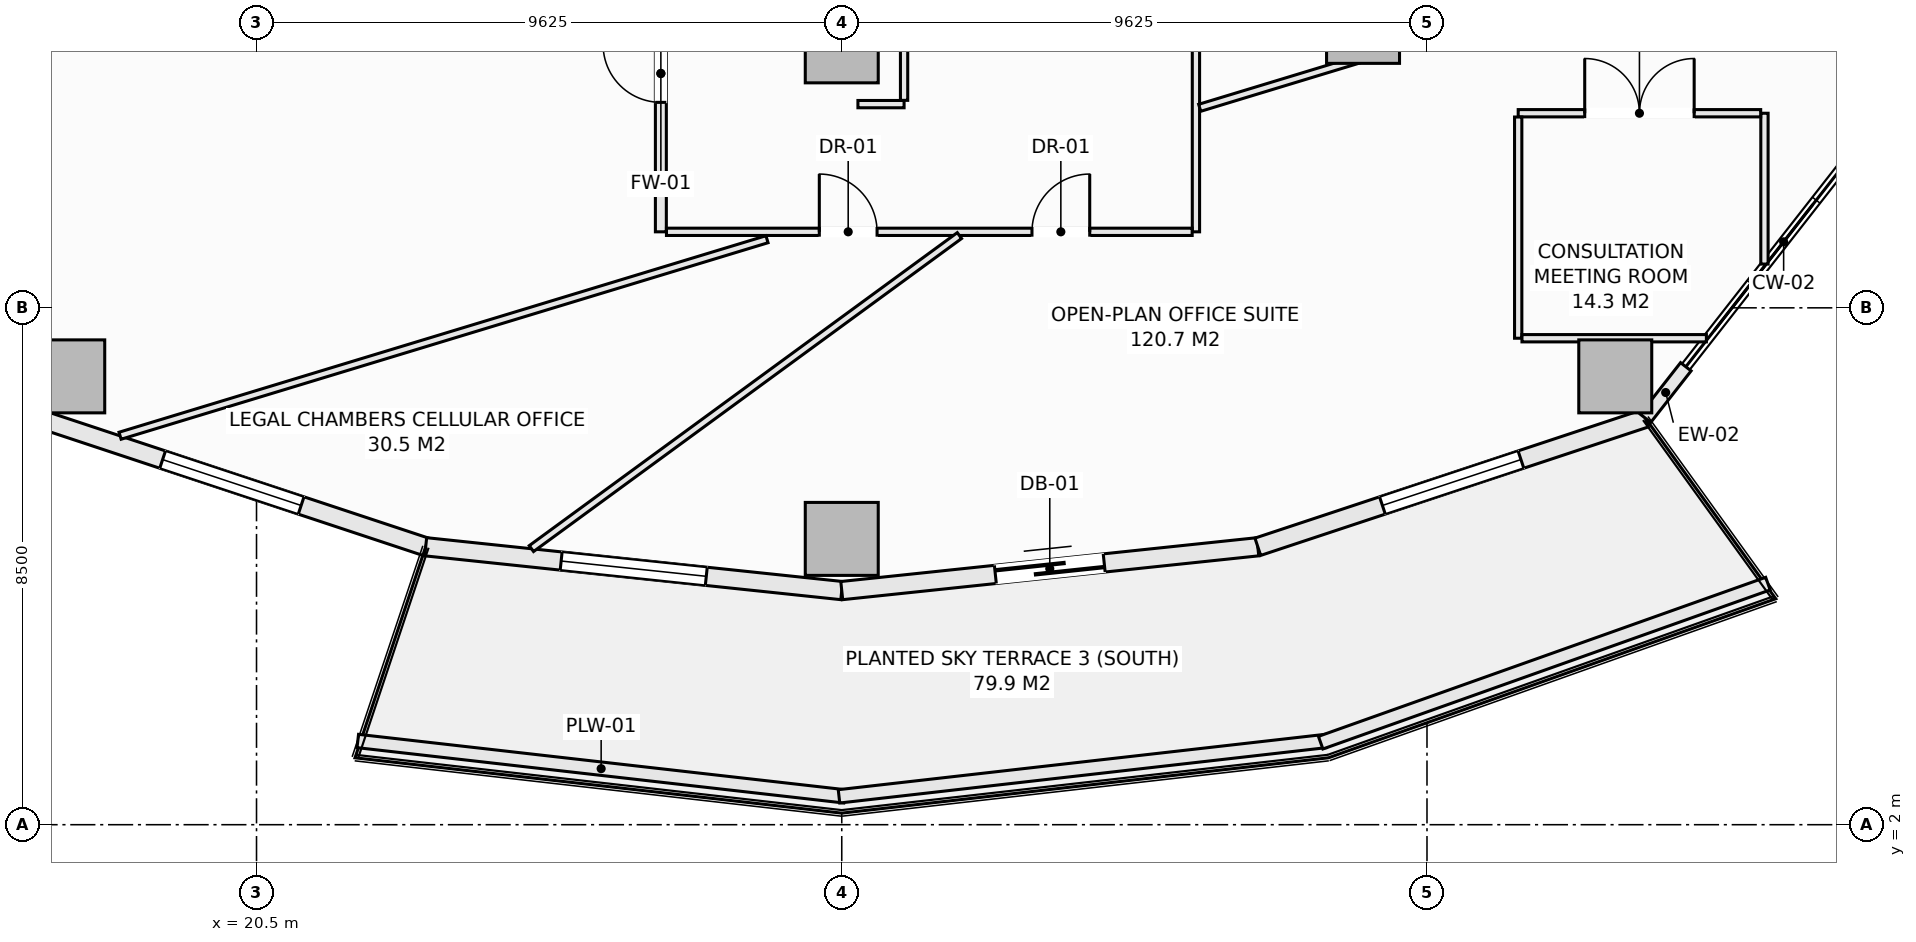
"""IFC4 building model, lengths in metres.
Left out: names, types, materials, properties, quantities, classifications, styles, units other than length and angle.
Written with IfcOpenShell. Run it as: python <this file> out.ifc"""

import sys

from ifc_helpers import new_model, si_unit, direction, frame, frame_2d, origin, origin_2d, place, context, subcontext, project, spatial, rectangle, extrude, element, fill, save


model = new_model("IFC4")
c1 = context("Model", 3, precision=1e-05, world=origin(), true_north=direction((0.0, 1.0)))
c2 = subcontext(c1, "Body", "Model", "MODEL_VIEW")
j1 = project(units=[si_unit("LENGTHUNIT", "METRE"), si_unit("PLANEANGLEUNIT", "RADIAN")], contexts=[c1])
p1 = place(None, origin())
s1 = spatial("IfcSite", under=j1, at=p1, CompositionType="ELEMENT")
p2 = place(p1, origin())
s2 = spatial("IfcBuilding", under=s1, at=p2, CompositionType="ELEMENT")
p3 = place(p2, frame((0.0, 0.0, 68.85)))
s3 = spatial("IfcBuildingStorey", under=s2, at=p3, CompositionType="ELEMENT", Elevation=68.85)
for number, where, z_axis, x_axis in (
    (1, (17.404, 9.373, -0.28), (0.0, 0.0, 1.0), (1.0, 0.0, 0.0)),
    (2, (30.125, 6.7, -0.28), (0.0, 0.0, 1.0), (1.0, 0.0, 0.0)),
    (3, (42.846, 9.373, -0.28), (0.0, 0.0, 1.0), (1.0, 0.0, 0.0)),
    (4, (30.125, 14.8, -0.28), (0.0, 0.0, 1.0), (1.0, 0.0, 0.0)),
    (5, (38.698, 15.121, -0.28), (0.0, 0.0, 1.0), (1.0, 0.0, 0.0)),
):
    element("IfcColumn", number, at=place(p3, frame(where, z_axis=z_axis, x_axis=x_axis)), inside=s3, PredefinedType="COLUMN", context=c2, shape_type="SweptSolid", body=[
        extrude(rectangle(XDim=1.2, YDim=1.2, at=origin_2d()), origin(), (0.0, 0.0, 1.0), 3.85),
    ])
p4 = place(p3, frame((16.906, 8.684, 0.0), z_axis=(0.0, 0.0, 1.0), x_axis=(0.949245153629, -0.314537181127, 0.0)))
e6 = element("IfcWall", 6, at=p4, inside=s3, PredefinedType="SOLIDWALL", context=c2, shape_type="SweptSolid", body=[
    extrude(rectangle(XDim=6.717, YDim=0.3, at=frame_2d((3.358, 0.0))), origin(), (0.0, 0.0, 1.0), 3.093),
])
p5 = place(p4, frame((2.159, 0.0, 0.85)))
e7 = element("IfcOpeningElement", 7, at=p5, cuts=e6, PredefinedType="OPENING", context=c2, shape_type="SweptSolid", body=[
    extrude(rectangle(XDim=2.4, YDim=1.9, at=frame_2d((1.2, 0.95))), frame((0.0, 0.16, 0.0), z_axis=(0.0, -1.0, 0.0), x_axis=(1.0, 0.0, 0.0)), (0.0, 0.0, 1.0), 0.32),
])
p6 = place(p3, frame((23.282, 6.571, 0.0), z_axis=(0.0, 0.0, 1.0), x_axis=(0.994498840295, -0.104747585419, 0.0)))
e8 = element("IfcWall", 8, at=p6, inside=s3, PredefinedType="SOLIDWALL", context=c2, shape_type="SweptSolid", body=[
    extrude(rectangle(XDim=6.88, YDim=0.3, at=frame_2d((3.44, 0.0))), origin(), (0.0, 0.0, 1.0), 3.093),
])
p7 = place(p6, frame((2.24, 0.0, 0.85)))
e9 = element("IfcOpeningElement", 9, at=p7, cuts=e8, PredefinedType="OPENING", context=c2, shape_type="SweptSolid", body=[
    extrude(rectangle(XDim=2.4, YDim=1.9, at=frame_2d((1.2, 0.95))), frame((0.0, 0.16, 0.0), z_axis=(0.0, -1.0, 0.0), x_axis=(1.0, 0.0, 0.0)), (0.0, 0.0, 1.0), 0.32),
])
p8 = place(p3, frame((30.125, 5.85, 0.0), z_axis=(0.0, 0.0, 1.0), x_axis=(0.994498840295, 0.104747585419, 0.0)))
e10 = element("IfcWall", 10, at=p8, inside=s3, PredefinedType="SOLIDWALL", context=c2, shape_type="SweptSolid", body=[
    extrude(rectangle(XDim=6.88, YDim=0.3, at=frame_2d((3.44, 0.0))), origin(), (0.0, 0.0, 1.0), 3.093),
])
p9 = place(p8, frame((2.54, 0.0, 0.0)))
e11 = element("IfcOpeningElement", 11, at=p9, cuts=e10, PredefinedType="OPENING", context=c2, shape_type="SweptSolid", body=[
    extrude(rectangle(XDim=1.8, YDim=2.25, at=frame_2d((0.9, 1.125))), frame((0.0, 0.16, 0.0), z_axis=(0.0, -1.0, 0.0), x_axis=(1.0, 0.0, 0.0)), (0.0, 0.0, 1.0), 0.32),
])
p10 = place(p3, frame((36.968, 6.571, 0.0), z_axis=(0.0, 0.0, 1.0), x_axis=(0.949245153629, 0.314537181127, 0.0)))
e12 = element("IfcWall", 12, at=p10, inside=s3, PredefinedType="SOLIDWALL", context=c2, shape_type="SweptSolid", body=[
    extrude(rectangle(XDim=6.717, YDim=0.3, at=frame_2d((3.358, 0.0))), origin(), (0.0, 0.0, 1.0), 3.093),
])
p11 = place(p10, frame((2.159, 0.0, 0.85)))
e13 = element("IfcOpeningElement", 13, at=p11, cuts=e12, PredefinedType="OPENING", context=c2, shape_type="SweptSolid", body=[
    extrude(rectangle(XDim=2.4, YDim=1.9, at=frame_2d((1.2, 0.95))), frame((0.0, 0.16, 0.0), z_axis=(0.0, -1.0, 0.0), x_axis=(1.0, 0.0, 0.0)), (0.0, 0.0, 1.0), 0.32),
])
p12 = place(p3, frame((43.344, 8.684, 0.0), z_axis=(0.0, 0.0, 1.0), x_axis=(0.616387780378, 0.787442762492, 0.0)))
e14 = element("IfcWall", 14, at=p12, inside=s3, PredefinedType="SOLIDWALL", context=c2, shape_type="SweptSolid", body=[
    extrude(rectangle(XDim=1.076, YDim=0.22, at=frame_2d((0.538, 0.0))), origin(), (0.0, 0.0, 1.0), 3.093),
])
for number, where, z_axis, x_axis in (
    (15, (22.166, 3.376, 0.0), (0.0, 0.0, 1.0), (0.994, -0.113, 0.0)),
    (16, (30.08, 2.466, 0.0), (0.0, 0.0, 1.0), (0.994, 0.113, 0.0)),
):
    element("IfcWall", number, at=place(p3, frame(where, z_axis=z_axis, x_axis=x_axis)), inside=s3, PredefinedType="PARAPET", context=c2, shape_type="SweptSolid", body=[
        extrude(rectangle(XDim=8.056, YDim=0.22, at=frame_2d((4.028, 0.0))), origin(), (0.0, 0.0, 1.0), 0.52),
    ])
p13 = place(p3, frame((38.001, 3.349, 0.0), z_axis=(0.0, 0.0, 1.0), x_axis=(0.942203722205, 0.335040513764, 0.0)))
e17 = element("IfcWall", 17, at=p13, inside=s3, PredefinedType="PARAPET", context=c2, shape_type="SweptSolid", body=[
    extrude(rectangle(XDim=7.807, YDim=0.22, at=frame_2d((3.904, 0.0))), origin(), (0.0, 0.0, 1.0), 0.52),
])
p14 = place(p3, frame((27.15, 11.75, 0.0), z_axis=(0.0, 0.0, 1.0), x_axis=(0.0, 1.0, 0.0)))
e18 = element("IfcWall", 18, at=p14, inside=s3, PredefinedType="SOLIDWALL", context=c2, shape_type="SweptSolid", body=[
    extrude(rectangle(XDim=5.208, YDim=0.18, at=frame_2d((2.604, 0.0))), origin(), (0.0, 0.0, 1.0), 3.57),
])
p15 = place(p14, frame((2.129, 0.0, 0.0)))
e19 = element("IfcOpeningElement", 19, at=p15, cuts=e18, PredefinedType="OPENING", context=c2, shape_type="SweptSolid", body=[
    extrude(rectangle(XDim=0.95, YDim=2.1, at=frame_2d((0.475, 1.05))), frame((0.0, 0.1, 0.0), z_axis=(0.0, -1.0, 0.0), x_axis=(1.0, 0.0, 0.0)), (0.0, 0.0, 1.0), 0.2),
])
p16 = place(p3, frame((35.95, 11.75, 0.0), z_axis=(0.0, 0.0, 1.0), x_axis=(0.0, 1.0, 0.0)))
e20 = element("IfcWall", 20, at=p16, inside=s3, PredefinedType="PARTITIONING", context=c2, shape_type="SweptSolid", body=[
    extrude(rectangle(XDim=3.838, YDim=0.12, at=frame_2d((1.919, 0.0))), origin(), (0.0, 0.0, 1.0), 3.57),
])
p17 = place(p3, frame((27.242, 11.75, 0.0), z_axis=(0.0, 0.0, 1.0), x_axis=(1.0, 0.0, 0.0)))
e21 = element("IfcWall", 21, at=p17, inside=s3, PredefinedType="PARTITIONING", context=c2, shape_type="SweptSolid", body=[
    extrude(rectangle(XDim=8.646, YDim=0.12, at=frame_2d((4.323, 0.0))), origin(), (0.0, 0.0, 1.0), 3.57),
])
p18 = place(p17, frame((2.514, 0.0, 0.0)))
e22 = element("IfcOpeningElement", 22, at=p18, cuts=e21, PredefinedType="OPENING", context=c2, shape_type="SweptSolid", body=[
    extrude(rectangle(XDim=0.95, YDim=2.1, at=frame_2d((0.475, 1.05))), frame((0.0, 0.07, 0.0), z_axis=(0.0, -1.0, 0.0), x_axis=(1.0, 0.0, 0.0)), (0.0, 0.0, 1.0), 0.14),
])
p19 = place(p17, frame((6.011, 0.0, 0.0)))
e23 = element("IfcOpeningElement", 23, at=p19, cuts=e21, PredefinedType="OPENING", context=c2, shape_type="SweptSolid", body=[
    extrude(rectangle(XDim=0.95, YDim=2.1, at=frame_2d((0.475, 1.05))), frame((0.0, 0.07, 0.0), z_axis=(0.0, -1.0, 0.0), x_axis=(1.0, 0.0, 0.0)), (0.0, 0.0, 1.0), 0.14),
])
p20 = place(p3, frame((30.391, 13.85, 0.0), z_axis=(0.0, 0.0, 1.0), x_axis=(1.0, 0.0, 0.0)))
e24 = element("IfcWall", 24, at=p20, inside=s3, PredefinedType="PARTITIONING", context=c2, shape_type="SweptSolid", body=[
    extrude(rectangle(XDim=0.759, YDim=0.12, at=frame_2d((0.379, 0.0))), origin(), (0.0, 0.0, 1.0), 3.57),
])
p21 = place(p3, frame((31.15, 13.912, 0.0), z_axis=(0.0, 0.0, 1.0), x_axis=(0.0, 1.0, 0.0)))
e25 = element("IfcWall", 25, at=p21, inside=s3, PredefinedType="PARTITIONING", context=c2, shape_type="SweptSolid", body=[
    extrude(rectangle(XDim=1.676, YDim=0.12, at=frame_2d((0.838, 0.0))), origin(), (0.0, 0.0, 1.0), 3.57),
])
p22 = place(p3, frame((18.256, 8.396, 0.0), z_axis=(0.0, 0.0, 1.0), x_axis=(0.9568399174, 0.290615506246, 0.0)))
e26 = element("IfcWall", 26, at=p22, inside=s3, PredefinedType="PARTITIONING", context=c2, shape_type="SweptSolid", body=[
    extrude(rectangle(XDim=11.119, YDim=0.12, at=frame_2d((5.56, 0.0))), origin(), (0.0, 0.0, 1.0), 3.093),
])
p23 = place(p3, frame((36.012, 13.79, 0.0), z_axis=(0.0, 0.0, 1.0), x_axis=(0.95683920317, 0.290617857809, 0.0)))
e27 = element("IfcWall", 27, at=p23, inside=s3, PredefinedType="PARTITIONING", context=c2, shape_type="SweptSolid", body=[
    extrude(rectangle(XDim=17.314, YDim=0.12, at=frame_2d((8.657, 0.0))), origin(), (0.0, 0.0, 1.0), 3.57),
])
p24 = place(p3, frame((25.021, 6.541, 0.0), z_axis=(0.0, 0.0, 1.0), x_axis=(0.80721771605, 0.590253808878, 0.0)))
e28 = element("IfcWall", 28, at=p24, inside=s3, PredefinedType="PARTITIONING", context=c2, shape_type="SweptSolid", body=[
    extrude(rectangle(XDim=8.721, YDim=0.12, at=frame_2d((4.36, 0.0))), origin(), (0.0, 0.0, 1.0), 3.57),
])
p25 = place(p3, frame((45.3, 11.22, 0.0), z_axis=(0.0, 0.0, 1.0), x_axis=(0.0, 1.0, 0.0)))
e29 = element("IfcWall", 29, at=p25, inside=s3, PredefinedType="PARTITIONING", context=c2, shape_type="SweptSolid", body=[
    extrude(rectangle(XDim=2.48, YDim=0.12, at=frame_2d((1.24, 0.0))), origin(), (0.0, 0.0, 1.0), 3.57),
])
p26 = place(p3, frame((41.25, 13.7, 0.0), z_axis=(0.0, 0.0, 1.0), x_axis=(1.0, 0.0, 0.0)))
e30 = element("IfcWall", 30, at=p26, inside=s3, PredefinedType="PARTITIONING", context=c2, shape_type="SweptSolid", body=[
    extrude(rectangle(XDim=3.988, YDim=0.12, at=frame_2d((1.994, 0.0))), origin(), (0.0, 0.0, 1.0), 3.57),
])
p27 = place(p26, frame((1.094, 0.0, 0.0)))
e31 = element("IfcOpeningElement", 31, at=p27, cuts=e30, PredefinedType="OPENING", context=c2, shape_type="SweptSolid", body=[
    extrude(rectangle(XDim=1.8, YDim=2.3, at=frame_2d((0.9, 1.15))), frame((0.0, 0.07, 0.0), z_axis=(0.0, -1.0, 0.0), x_axis=(1.0, 0.0, 0.0)), (0.0, 0.0, 1.0), 0.14),
])
p28 = place(p3, frame((41.25, 10.0, 0.0), z_axis=(0.0, 0.0, 1.0), x_axis=(0.0, 1.0, 0.0)))
e32 = element("IfcWall", 32, at=p28, inside=s3, PredefinedType="PARTITIONING", context=c2, shape_type="SweptSolid", body=[
    extrude(rectangle(XDim=3.638, YDim=0.12, at=frame_2d((1.819, 0.0))), origin(), (0.0, 0.0, 1.0), 2.934),
])
p29 = place(p3, frame((41.312, 10.0, 0.0), z_axis=(0.0, 0.0, 1.0), x_axis=(1.0, 0.0, 0.0)))
e33 = element("IfcWall", 33, at=p29, inside=s3, PredefinedType="PARTITIONING", context=c2, shape_type="SweptSolid", body=[
    extrude(rectangle(XDim=3.033, YDim=0.12, at=frame_2d((1.517, 0.0))), origin(), (0.0, 0.0, 1.0), 3.093),
])
p30 = place(p5, origin())
e34 = element("IfcWindow", 34, at=p30, inside=s3, PartitioningType="SINGLE_PANEL", PredefinedType="WINDOW", context=c2, shape_type="SweptSolid", body=[
    extrude(rectangle(XDim=2.4, YDim=1.9, at=frame_2d((1.2, 0.95))), frame((0.0, 0.03, 0.0), z_axis=(0.0, -1.0, 0.0), x_axis=(1.0, 0.0, 0.0)), (0.0, 0.0, 1.0), 0.06),
])
fill(e7, e34)
p31 = place(p7, origin())
e35 = element("IfcWindow", 35, at=p31, inside=s3, PartitioningType="SINGLE_PANEL", PredefinedType="WINDOW", context=c2, shape_type="SweptSolid", body=[
    extrude(rectangle(XDim=2.4, YDim=1.9, at=frame_2d((1.2, 0.95))), frame((0.0, 0.03, 0.0), z_axis=(0.0, -1.0, 0.0), x_axis=(1.0, 0.0, 0.0)), (0.0, 0.0, 1.0), 0.06),
])
fill(e9, e35)
p32 = place(p9, frame((1.8, 0.0, 0.0), z_axis=(0.0, 0.0, 1.0), x_axis=(-1.0, 0.0, 0.0)))
e36 = element("IfcDoor", 36, at=p32, inside=s3, OperationType="SLIDING_TO_LEFT", PredefinedType="DOOR", context=c2, shape_type="SweptSolid", body=[
    extrude(rectangle(XDim=1.8, YDim=2.25, at=frame_2d((0.9, 1.125))), frame((0.0, 0.025, 0.0), z_axis=(0.0, -1.0, 0.0), x_axis=(1.0, 0.0, 0.0)), (0.0, 0.0, 1.0), 0.05),
])
fill(e11, e36)
p33 = place(p11, origin())
e37 = element("IfcWindow", 37, at=p33, inside=s3, PartitioningType="SINGLE_PANEL", PredefinedType="WINDOW", context=c2, shape_type="SweptSolid", body=[
    extrude(rectangle(XDim=2.4, YDim=1.9, at=frame_2d((1.2, 0.95))), frame((0.0, 0.03, 0.0), z_axis=(0.0, -1.0, 0.0), x_axis=(1.0, 0.0, 0.0)), (0.0, 0.0, 1.0), 0.06),
])
fill(e13, e37)
p34 = place(p15, origin())
e38 = element("IfcDoor", 38, at=p34, inside=s3, OperationType="SINGLE_SWING_RIGHT", PredefinedType="DOOR", context=c2, shape_type="SweptSolid", body=[
    extrude(rectangle(XDim=0.95, YDim=2.1, at=frame_2d((0.475, 1.05))), frame((0.0, 0.025, 0.0), z_axis=(0.0, -1.0, 0.0), x_axis=(1.0, 0.0, 0.0)), (0.0, 0.0, 1.0), 0.05),
])
fill(e19, e38)
p35 = place(p18, origin())
e39 = element("IfcDoor", 39, at=p35, inside=s3, OperationType="SINGLE_SWING_LEFT", PredefinedType="DOOR", context=c2, shape_type="SweptSolid", body=[
    extrude(rectangle(XDim=0.95, YDim=2.1, at=frame_2d((0.475, 1.05))), frame((0.0, 0.025, 0.0), z_axis=(0.0, -1.0, 0.0), x_axis=(1.0, 0.0, 0.0)), (0.0, 0.0, 1.0), 0.05),
])
fill(e22, e39)
p36 = place(p19, origin())
e40 = element("IfcDoor", 40, at=p36, inside=s3, OperationType="SINGLE_SWING_RIGHT", PredefinedType="DOOR", context=c2, shape_type="SweptSolid", body=[
    extrude(rectangle(XDim=0.95, YDim=2.1, at=frame_2d((0.475, 1.05))), frame((0.0, 0.025, 0.0), z_axis=(0.0, -1.0, 0.0), x_axis=(1.0, 0.0, 0.0)), (0.0, 0.0, 1.0), 0.05),
])
fill(e23, e40)
p37 = place(p27, origin())
e41 = element("IfcDoor", 41, at=p37, inside=s3, OperationType="DOUBLE_DOOR_SINGLE_SWING", PredefinedType="DOOR", context=c2, shape_type="SweptSolid", body=[
    extrude(rectangle(XDim=1.8, YDim=2.3, at=frame_2d((0.9, 1.15))), frame((0.0, 0.025, 0.0), z_axis=(0.0, -1.0, 0.0), x_axis=(1.0, 0.0, 0.0)), (0.0, 0.0, 1.0), 0.05),
])
fill(e31, e41)
save(model, sys.argv[1])
